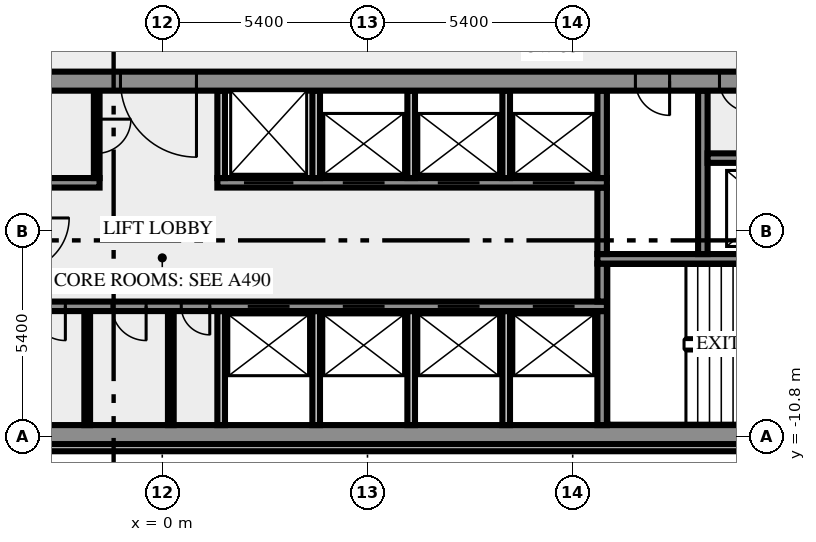
"""IFC4 building model, lengths in metres.
Left out: names, types, materials, properties, quantities, classifications, styles, units other than length and angle.
Written with IfcOpenShell. Run it as: python <this file> out.ifc"""

import sys

from ifc_helpers import new_model, si_unit, direction, frame, frame_2d, origin, place, context, subcontext, project, spatial, rectangle, extrude, element, fill, save


model = new_model("IFC4")
c1 = context("Model", 3, precision=1e-05, world=origin(), true_north=direction((0.0, 1.0)))
c2 = subcontext(c1, "Body", "Model", "MODEL_VIEW")
j1 = project(units=[si_unit("LENGTHUNIT", "METRE"), si_unit("PLANEANGLEUNIT", "RADIAN")], contexts=[c1])
p1 = place(None, origin())
s1 = spatial("IfcSite", under=j1, at=p1, CompositionType="ELEMENT")
p2 = place(p1, origin())
s2 = spatial("IfcBuilding", under=s1, at=p2, CompositionType="ELEMENT")
p3 = place(p2, frame((0.0, 0.0, 194.0)))
s3 = spatial("IfcBuildingStorey", under=s2, at=p3, CompositionType="ELEMENT", Elevation=194.0)
p4 = place(p3, frame((-17.444, -11.088, 0.0), z_axis=(0.0, 0.0, 1.0), x_axis=(1.0, 0.0, 0.0)))
e1 = element("IfcWall", 1, at=p4, inside=s3, PredefinedType="SOLIDWALL", context=c2, shape_type="SweptSolid", body=[
    extrude(rectangle(XDim=34.888, YDim=0.2, at=frame_2d((17.444, 0.0))), origin(), (0.0, 0.0, 1.0), 3.65),
])
p5 = place(p3, frame((-20.0, -10.75, 0.0), z_axis=(0.0, 0.0, 1.0), x_axis=(1.0, 0.0, 0.0)))
e2 = element("IfcWall", 2, at=p5, inside=s3, PredefinedType="SHEAR", context=c2, shape_type="SweptSolid", body=[
    extrude(rectangle(XDim=40.0, YDim=0.5, at=frame_2d((20.0, 0.0))), origin(), (0.0, 0.0, 1.0), 3.65),
])
p6 = place(p5, frame((0.8, 0.0, 1.0)))
e3 = element("IfcOpeningElement", 3, at=p6, cuts=e2, PredefinedType="OPENING", context=c2, shape_type="SweptSolid", body=[
    extrude(rectangle(XDim=1.2, YDim=1.2, at=frame_2d((0.6, 0.6))), frame((0.0, 0.26, 0.0), z_axis=(0.0, -1.0, 0.0), x_axis=(1.0, 0.0, 0.0)), (0.0, 0.0, 1.0), 0.52),
])
p7 = place(p5, frame((38.0, 0.0, 1.0)))
e4 = element("IfcOpeningElement", 4, at=p7, cuts=e2, PredefinedType="OPENING", context=c2, shape_type="SweptSolid", body=[
    extrude(rectangle(XDim=1.2, YDim=1.2, at=frame_2d((0.6, 0.6))), frame((0.0, 0.26, 0.0), z_axis=(0.0, -1.0, 0.0), x_axis=(1.0, 0.0, 0.0)), (0.0, 0.0, 1.0), 0.52),
])
for number, where, z_axis, x_axis in (
    (5, (-1.975, -10.5, 0.0), (0.0, 0.0, 1.0), (0.0, 1.0, 0.0)),
    (6, (0.225, -10.5, 0.0), (0.0, 0.0, 1.0), (0.0, 1.0, 0.0)),
):
    element("IfcWall", number, at=place(p3, frame(where, z_axis=z_axis, x_axis=x_axis)), inside=s3, PredefinedType="PARTITIONING", context=c2, shape_type="SweptSolid", body=[
        extrude(rectangle(XDim=3.0, YDim=0.15, at=frame_2d((1.5, 0.0))), origin(), (0.0, 0.0, 1.0), 3.65),
    ])
for number, where, z_axis, x_axis in (
    (7, (1.55, -10.5, 0.0), (0.0, 0.0, 1.0), (0.0, 1.0, 0.0)),
    (8, (4.05, -10.5, 0.0), (0.0, 0.0, 1.0), (0.0, 1.0, 0.0)),
    (9, (6.55, -10.5, 0.0), (0.0, 0.0, 1.0), (0.0, 1.0, 0.0)),
    (10, (9.05, -10.5, 0.0), (0.0, 0.0, 1.0), (0.0, 1.0, 0.0)),
):
    element("IfcWall", number, at=place(p3, frame(where, z_axis=z_axis, x_axis=x_axis)), inside=s3, PredefinedType="SOLIDWALL", context=c2, shape_type="SweptSolid", body=[
        extrude(rectangle(XDim=3.0, YDim=0.2, at=frame_2d((1.5, 0.0))), origin(), (0.0, 0.0, 1.0), 3.65),
    ])
p8 = place(p3, frame((11.575, -10.5, 0.0), z_axis=(0.0, 0.0, 1.0), x_axis=(0.0, 1.0, 0.0)))
e11 = element("IfcWall", 11, at=p8, inside=s3, PredefinedType="SHEAR", context=c2, shape_type="SweptSolid", body=[
    extrude(rectangle(XDim=3.0, YDim=0.25, at=frame_2d((1.5, 0.0))), origin(), (0.0, 0.0, 1.0), 3.65),
])
p9 = place(p3, frame((11.7, -7.375, 0.0), z_axis=(0.0, 0.0, 1.0), x_axis=(-1.0, 0.0, 0.0)))
e12 = element("IfcWall", 12, at=p9, inside=s3, PredefinedType="SHEAR", context=c2, shape_type="SweptSolid", body=[
    extrude(rectangle(XDim=23.4, YDim=0.25, at=frame_2d((11.7, 0.0))), origin(), (0.0, 0.0, 1.0), 3.65),
])
p10 = place(p9, frame((22.012, 0.0, 0.0)))
e13 = element("IfcOpeningElement", 13, at=p10, cuts=e12, PredefinedType="OPENING", context=c2, shape_type="SweptSolid", body=[
    extrude(rectangle(XDim=0.9, YDim=2.1, at=frame_2d((0.45, 1.05))), frame((0.0, 0.135, 0.0), z_axis=(0.0, -1.0, 0.0), x_axis=(1.0, 0.0, 0.0)), (0.0, 0.0, 1.0), 0.27),
])
p11 = place(p9, frame((20.25, 0.0, 0.0)))
e14 = element("IfcOpeningElement", 14, at=p11, cuts=e12, PredefinedType="OPENING", context=c2, shape_type="SweptSolid", body=[
    extrude(rectangle(XDim=0.9, YDim=2.1, at=frame_2d((0.45, 1.05))), frame((0.0, 0.135, 0.0), z_axis=(0.0, -1.0, 0.0), x_axis=(1.0, 0.0, 0.0)), (0.0, 0.0, 1.0), 0.27),
])
p12 = place(p9, frame((18.25, 0.0, 0.0)))
e15 = element("IfcOpeningElement", 15, at=p12, cuts=e12, PredefinedType="OPENING", context=c2, shape_type="SweptSolid", body=[
    extrude(rectangle(XDim=0.9, YDim=2.1, at=frame_2d((0.45, 1.05))), frame((0.0, 0.135, 0.0), z_axis=(0.0, -1.0, 0.0), x_axis=(1.0, 0.0, 0.0)), (0.0, 0.0, 1.0), 0.27),
])
p13 = place(p9, frame((16.287, 0.0, 0.0)))
e16 = element("IfcOpeningElement", 16, at=p13, cuts=e12, PredefinedType="OPENING", context=c2, shape_type="SweptSolid", body=[
    extrude(rectangle(XDim=0.9, YDim=2.1, at=frame_2d((0.45, 1.05))), frame((0.0, 0.135, 0.0), z_axis=(0.0, -1.0, 0.0), x_axis=(1.0, 0.0, 0.0)), (0.0, 0.0, 1.0), 0.27),
])
p14 = place(p9, frame((14.25, 0.0, 0.0)))
e17 = element("IfcOpeningElement", 17, at=p14, cuts=e12, PredefinedType="OPENING", context=c2, shape_type="SweptSolid", body=[
    extrude(rectangle(XDim=0.9, YDim=2.1, at=frame_2d((0.45, 1.05))), frame((0.0, 0.135, 0.0), z_axis=(0.0, -1.0, 0.0), x_axis=(1.0, 0.0, 0.0)), (0.0, 0.0, 1.0), 0.27),
])
p15 = place(p9, frame((12.125, 0.0, 0.0)))
e18 = element("IfcOpeningElement", 18, at=p15, cuts=e12, PredefinedType="OPENING", context=c2, shape_type="SweptSolid", body=[
    extrude(rectangle(XDim=0.9, YDim=2.1, at=frame_2d((0.45, 1.05))), frame((0.0, 0.135, 0.0), z_axis=(0.0, -1.0, 0.0), x_axis=(1.0, 0.0, 0.0)), (0.0, 0.0, 1.0), 0.27),
])
p16 = place(p9, frame((10.45, 0.0, 0.0)))
e19 = element("IfcOpeningElement", 19, at=p16, cuts=e12, PredefinedType="OPENING", context=c2, shape_type="SweptSolid", body=[
    extrude(rectangle(XDim=0.75, YDim=2.1, at=frame_2d((0.375, 1.05))), frame((0.0, 0.135, 0.0), z_axis=(0.0, -1.0, 0.0), x_axis=(1.0, 0.0, 0.0)), (0.0, 0.0, 1.0), 0.27),
])
p17 = place(p9, frame((8.35, 0.0, 0.0)))
e20 = element("IfcOpeningElement", 20, at=p17, cuts=e12, PredefinedType="OPENING", context=c2, shape_type="SweptSolid", body=[
    extrude(rectangle(XDim=1.1, YDim=2.1, at=frame_2d((0.55, 1.05))), frame((0.0, 0.135, 0.0), z_axis=(0.0, -1.0, 0.0), x_axis=(1.0, 0.0, 0.0)), (0.0, 0.0, 1.0), 0.27),
])
p18 = place(p9, frame((5.85, 0.0, 0.0)))
e21 = element("IfcOpeningElement", 21, at=p18, cuts=e12, PredefinedType="OPENING", context=c2, shape_type="SweptSolid", body=[
    extrude(rectangle(XDim=1.1, YDim=2.1, at=frame_2d((0.55, 1.05))), frame((0.0, 0.135, 0.0), z_axis=(0.0, -1.0, 0.0), x_axis=(1.0, 0.0, 0.0)), (0.0, 0.0, 1.0), 0.27),
])
p19 = place(p9, frame((3.35, 0.0, 0.0)))
e22 = element("IfcOpeningElement", 22, at=p19, cuts=e12, PredefinedType="OPENING", context=c2, shape_type="SweptSolid", body=[
    extrude(rectangle(XDim=1.1, YDim=2.1, at=frame_2d((0.55, 1.05))), frame((0.0, 0.135, 0.0), z_axis=(0.0, -1.0, 0.0), x_axis=(1.0, 0.0, 0.0)), (0.0, 0.0, 1.0), 0.27),
])
p20 = place(p9, frame((0.85, 0.0, 0.0)))
e23 = element("IfcOpeningElement", 23, at=p20, cuts=e12, PredefinedType="OPENING", context=c2, shape_type="SweptSolid", body=[
    extrude(rectangle(XDim=1.1, YDim=2.1, at=frame_2d((0.55, 1.05))), frame((0.0, 0.135, 0.0), z_axis=(0.0, -1.0, 0.0), x_axis=(1.0, 0.0, 0.0)), (0.0, 0.0, 1.0), 0.27),
])
p21 = place(p3, frame((11.575, -7.25, 0.0), z_axis=(0.0, 0.0, 1.0), x_axis=(0.0, 1.0, 0.0)))
e24 = element("IfcWall", 24, at=p21, inside=s3, PredefinedType="SHEAR", context=c2, shape_type="SweptSolid", body=[
    extrude(rectangle(XDim=1.0, YDim=0.25, at=frame_2d((0.5, 0.0))), origin(), (0.0, 0.0, 1.0), 3.65),
])
p22 = place(p3, frame((19.5, -6.125, 0.0), z_axis=(0.0, 0.0, 1.0), x_axis=(-1.0, 0.0, 0.0)))
e25 = element("IfcWall", 25, at=p22, inside=s3, PredefinedType="SHEAR", context=c2, shape_type="SweptSolid", body=[
    extrude(rectangle(XDim=8.05, YDim=0.25, at=frame_2d((4.025, 0.0))), origin(), (0.0, 0.0, 1.0), 3.65),
])
p23 = place(p22, frame((0.05, 0.0, 0.0)))
e26 = element("IfcOpeningElement", 26, at=p23, cuts=e25, PredefinedType="OPENING", context=c2, shape_type="SweptSolid", body=[
    extrude(rectangle(XDim=1.8, YDim=2.1, at=frame_2d((0.9, 1.05))), frame((0.0, 0.135, 0.0), z_axis=(0.0, -1.0, 0.0), x_axis=(1.0, 0.0, 0.0)), (0.0, 0.0, 1.0), 0.27),
])
p24 = place(p3, frame((11.575, -6.0, 0.0), z_axis=(0.0, 0.0, 1.0), x_axis=(0.0, 1.0, 0.0)))
e27 = element("IfcWall", 27, at=p24, inside=s3, PredefinedType="SHEAR", context=c2, shape_type="SweptSolid", body=[
    extrude(rectangle(XDim=1.75, YDim=0.25, at=frame_2d((0.875, 0.0))), origin(), (0.0, 0.0, 1.0), 3.65),
])
p25 = place(p3, frame((14.225, -6.0, 0.0), z_axis=(0.0, 0.0, 1.0), x_axis=(0.0, 1.0, 0.0)))
e28 = element("IfcWall", 28, at=p25, inside=s3, PredefinedType="SHEAR", context=c2, shape_type="SweptSolid", body=[
    extrude(rectangle(XDim=4.3, YDim=0.25, at=frame_2d((2.15, 0.0))), origin(), (0.0, 0.0, 1.0), 3.65),
])
p26 = place(p3, frame((-11.7, -4.125, 0.0), z_axis=(0.0, 0.0, 1.0), x_axis=(1.0, 0.0, 0.0)))
e29 = element("IfcWall", 29, at=p26, inside=s3, PredefinedType="SHEAR", context=c2, shape_type="SweptSolid", body=[
    extrude(rectangle(XDim=10.05, YDim=0.25, at=frame_2d((5.025, 0.0))), origin(), (0.0, 0.0, 1.0), 3.65),
])
p27 = place(p3, frame((1.45, -4.125, 0.0), z_axis=(0.0, 0.0, 1.0), x_axis=(1.0, 0.0, 0.0)))
e30 = element("IfcWall", 30, at=p27, inside=s3, PredefinedType="SHEAR", context=c2, shape_type="SweptSolid", body=[
    extrude(rectangle(XDim=10.25, YDim=0.25, at=frame_2d((5.125, 0.0))), origin(), (0.0, 0.0, 1.0), 3.65),
])
p28 = place(p27, frame((0.7, 0.0, 0.0)))
e31 = element("IfcOpeningElement", 31, at=p28, cuts=e30, PredefinedType="OPENING", context=c2, shape_type="SweptSolid", body=[
    extrude(rectangle(XDim=1.3, YDim=2.1, at=frame_2d((0.65, 1.05))), frame((0.0, 0.135, 0.0), z_axis=(0.0, -1.0, 0.0), x_axis=(1.0, 0.0, 0.0)), (0.0, 0.0, 1.0), 0.27),
])
p29 = place(p27, frame((3.3, 0.0, 0.0)))
e32 = element("IfcOpeningElement", 32, at=p29, cuts=e30, PredefinedType="OPENING", context=c2, shape_type="SweptSolid", body=[
    extrude(rectangle(XDim=1.1, YDim=2.1, at=frame_2d((0.55, 1.05))), frame((0.0, 0.135, 0.0), z_axis=(0.0, -1.0, 0.0), x_axis=(1.0, 0.0, 0.0)), (0.0, 0.0, 1.0), 0.27),
])
p30 = place(p27, frame((5.8, 0.0, 0.0)))
e33 = element("IfcOpeningElement", 33, at=p30, cuts=e30, PredefinedType="OPENING", context=c2, shape_type="SweptSolid", body=[
    extrude(rectangle(XDim=1.1, YDim=2.1, at=frame_2d((0.55, 1.05))), frame((0.0, 0.135, 0.0), z_axis=(0.0, -1.0, 0.0), x_axis=(1.0, 0.0, 0.0)), (0.0, 0.0, 1.0), 0.27),
])
p31 = place(p27, frame((8.3, 0.0, 0.0)))
e34 = element("IfcOpeningElement", 34, at=p31, cuts=e30, PredefinedType="OPENING", context=c2, shape_type="SweptSolid", body=[
    extrude(rectangle(XDim=1.1, YDim=2.1, at=frame_2d((0.55, 1.05))), frame((0.0, 0.135, 0.0), z_axis=(0.0, -1.0, 0.0), x_axis=(1.0, 0.0, 0.0)), (0.0, 0.0, 1.0), 0.27),
])
p32 = place(p3, frame((-1.725, -1.7, 0.0), z_axis=(0.0, 0.0, 1.0), x_axis=(0.0, -1.0, 0.0)))
e35 = element("IfcWall", 35, at=p32, inside=s3, PredefinedType="PARTITIONING", context=c2, shape_type="SweptSolid", body=[
    extrude(rectangle(XDim=2.3, YDim=0.15, at=frame_2d((1.15, 0.0))), origin(), (0.0, 0.0, 1.0), 3.65),
])
p33 = place(p32, frame((0.75, 0.0, 0.0)))
e36 = element("IfcOpeningElement", 36, at=p33, cuts=e35, PredefinedType="OPENING", context=c2, shape_type="SweptSolid", body=[
    extrude(rectangle(XDim=0.9, YDim=2.1, at=frame_2d((0.45, 1.05))), frame((0.0, 0.085, 0.0), z_axis=(0.0, -1.0, 0.0), x_axis=(1.0, 0.0, 0.0)), (0.0, 0.0, 1.0), 0.17),
])
for number, where, z_axis, x_axis in (
    (37, (1.55, -4.0, 0.0), (0.0, 0.0, 1.0), (0.0, 1.0, 0.0)),
    (38, (4.05, -4.0, 0.0), (0.0, 0.0, 1.0), (0.0, 1.0, 0.0)),
    (39, (6.55, -4.0, 0.0), (0.0, 0.0, 1.0), (0.0, 1.0, 0.0)),
    (40, (9.05, -4.0, 0.0), (0.0, 0.0, 1.0), (0.0, 1.0, 0.0)),
):
    element("IfcWall", number, at=place(p3, frame(where, z_axis=z_axis, x_axis=x_axis)), inside=s3, PredefinedType="SOLIDWALL", context=c2, shape_type="SweptSolid", body=[
        extrude(rectangle(XDim=2.3, YDim=0.2, at=frame_2d((1.15, 0.0))), origin(), (0.0, 0.0, 1.0), 3.65),
    ])
p34 = place(p3, frame((11.575, -4.0, 0.0), z_axis=(0.0, 0.0, 1.0), x_axis=(0.0, 1.0, 0.0)))
e41 = element("IfcWall", 41, at=p34, inside=s3, PredefinedType="SHEAR", context=c2, shape_type="SweptSolid", body=[
    extrude(rectangle(XDim=2.3, YDim=0.25, at=frame_2d((1.15, 0.0))), origin(), (0.0, 0.0, 1.0), 3.65),
])
p35 = place(p3, frame((14.35, -3.475, 0.0), z_axis=(0.0, 0.0, 1.0), x_axis=(1.0, 0.0, 0.0)))
e42 = element("IfcWall", 42, at=p35, inside=s3, PredefinedType="SHEAR", context=c2, shape_type="SweptSolid", body=[
    extrude(rectangle(XDim=3.0, YDim=0.25, at=frame_2d((1.5, 0.0))), origin(), (0.0, 0.0, 1.0), 3.65),
])
p36 = place(p3, frame((20.49, -1.45, 0.0), z_axis=(0.0, 0.0, 1.0), x_axis=(-1.0, 0.0, 0.0)))
e43 = element("IfcWall", 43, at=p36, inside=s3, PredefinedType="SHEAR", context=c2, shape_type="SweptSolid", body=[
    extrude(rectangle(XDim=40.98, YDim=0.5, at=frame_2d((20.49, 0.0))), origin(), (0.0, 0.0, 1.0), 3.65),
])
p37 = place(p36, frame((38.14, 0.0, 0.0)))
e44 = element("IfcOpeningElement", 44, at=p37, cuts=e43, PredefinedType="OPENING", context=c2, shape_type="SweptSolid", body=[
    extrude(rectangle(XDim=1.8, YDim=2.1, at=frame_2d((0.9, 1.05))), frame((0.0, 0.26, 0.0), z_axis=(0.0, -1.0, 0.0), x_axis=(1.0, 0.0, 0.0)), (0.0, 0.0, 1.0), 0.52),
])
p38 = place(p36, frame((35.89, 0.0, 0.0)))
e45 = element("IfcOpeningElement", 45, at=p38, cuts=e43, PredefinedType="OPENING", context=c2, shape_type="SweptSolid", body=[
    extrude(rectangle(XDim=0.9, YDim=2.1, at=frame_2d((0.45, 1.05))), frame((0.0, 0.26, 0.0), z_axis=(0.0, -1.0, 0.0), x_axis=(1.0, 0.0, 0.0)), (0.0, 0.0, 1.0), 0.52),
])
p39 = place(p36, frame((32.94, 0.0, 0.0)))
e46 = element("IfcOpeningElement", 46, at=p39, cuts=e43, PredefinedType="OPENING", context=c2, shape_type="SweptSolid", body=[
    extrude(rectangle(XDim=0.9, YDim=2.1, at=frame_2d((0.45, 1.05))), frame((0.0, 0.26, 0.0), z_axis=(0.0, -1.0, 0.0), x_axis=(1.0, 0.0, 0.0)), (0.0, 0.0, 1.0), 0.52),
])
p40 = place(p36, frame((30.302, 0.0, 0.0)))
e47 = element("IfcOpeningElement", 47, at=p40, cuts=e43, PredefinedType="OPENING", context=c2, shape_type="SweptSolid", body=[
    extrude(rectangle(XDim=0.9, YDim=2.1, at=frame_2d((0.45, 1.05))), frame((0.0, 0.26, 0.0), z_axis=(0.0, -1.0, 0.0), x_axis=(1.0, 0.0, 0.0)), (0.0, 0.0, 1.0), 0.52),
])
p41 = place(p36, frame((26.577, 0.0, 0.0)))
e48 = element("IfcOpeningElement", 48, at=p41, cuts=e43, PredefinedType="OPENING", context=c2, shape_type="SweptSolid", body=[
    extrude(rectangle(XDim=0.9, YDim=2.1, at=frame_2d((0.45, 1.05))), frame((0.0, 0.26, 0.0), z_axis=(0.0, -1.0, 0.0), x_axis=(1.0, 0.0, 0.0)), (0.0, 0.0, 1.0), 0.52),
])
p42 = place(p36, frame((19.59, 0.0, 0.0)))
e49 = element("IfcOpeningElement", 49, at=p42, cuts=e43, PredefinedType="OPENING", context=c2, shape_type="SweptSolid", body=[
    extrude(rectangle(XDim=2.0, YDim=2.1, at=frame_2d((1.0, 1.05))), frame((0.0, 0.26, 0.0), z_axis=(0.0, -1.0, 0.0), x_axis=(1.0, 0.0, 0.0)), (0.0, 0.0, 1.0), 0.52),
])
p43 = place(p36, frame((7.14, 0.0, 0.0)))
e50 = element("IfcOpeningElement", 50, at=p43, cuts=e43, PredefinedType="OPENING", context=c2, shape_type="SweptSolid", body=[
    extrude(rectangle(XDim=0.9, YDim=2.1, at=frame_2d((0.45, 1.05))), frame((0.0, 0.26, 0.0), z_axis=(0.0, -1.0, 0.0), x_axis=(1.0, 0.0, 0.0)), (0.0, 0.0, 1.0), 0.52),
])
p44 = place(p36, frame((5.028, 0.0, 0.0)))
e51 = element("IfcOpeningElement", 51, at=p44, cuts=e43, PredefinedType="OPENING", context=c2, shape_type="SweptSolid", body=[
    extrude(rectangle(XDim=0.8, YDim=2.1, at=frame_2d((0.4, 1.05))), frame((0.0, 0.26, 0.0), z_axis=(0.0, -1.0, 0.0), x_axis=(1.0, 0.0, 0.0)), (0.0, 0.0, 1.0), 0.52),
])
p45 = place(p36, frame((3.452, 0.0, 0.0)))
e52 = element("IfcOpeningElement", 52, at=p45, cuts=e43, PredefinedType="OPENING", context=c2, shape_type="SweptSolid", body=[
    extrude(rectangle(XDim=0.8, YDim=2.1, at=frame_2d((0.4, 1.05))), frame((0.0, 0.26, 0.0), z_axis=(0.0, -1.0, 0.0), x_axis=(1.0, 0.0, 0.0)), (0.0, 0.0, 1.0), 0.52),
])
p46 = place(p36, frame((1.04, 0.0, 0.0)))
e53 = element("IfcOpeningElement", 53, at=p46, cuts=e43, PredefinedType="OPENING", context=c2, shape_type="SweptSolid", body=[
    extrude(rectangle(XDim=1.8, YDim=2.1, at=frame_2d((0.9, 1.05))), frame((0.0, 0.26, 0.0), z_axis=(0.0, -1.0, 0.0), x_axis=(1.0, 0.0, 0.0)), (0.0, 0.0, 1.0), 0.52),
])
p47 = place(p14, origin())
e54 = element("IfcDoor", 54, at=p47, inside=s3, OperationType="SINGLE_SWING_RIGHT", PredefinedType="DOOR", context=c2, shape_type="SweptSolid", body=[
    extrude(rectangle(XDim=0.9, YDim=2.1, at=frame_2d((0.45, 1.05))), frame((0.0, 0.025, 0.0), z_axis=(0.0, -1.0, 0.0), x_axis=(1.0, 0.0, 0.0)), (0.0, 0.0, 1.0), 0.05),
])
fill(e17, e54)
p48 = place(p15, origin())
e55 = element("IfcDoor", 55, at=p48, inside=s3, OperationType="SINGLE_SWING_RIGHT", PredefinedType="DOOR", context=c2, shape_type="SweptSolid", body=[
    extrude(rectangle(XDim=0.9, YDim=2.1, at=frame_2d((0.45, 1.05))), frame((0.0, 0.025, 0.0), z_axis=(0.0, -1.0, 0.0), x_axis=(1.0, 0.0, 0.0)), (0.0, 0.0, 1.0), 0.05),
])
fill(e18, e55)
p49 = place(p16, origin())
e56 = element("IfcDoor", 56, at=p49, inside=s3, OperationType="SINGLE_SWING_LEFT", PredefinedType="DOOR", context=c2, shape_type="SweptSolid", body=[
    extrude(rectangle(XDim=0.75, YDim=2.1, at=frame_2d((0.375, 1.05))), frame((0.0, 0.025, 0.0), z_axis=(0.0, -1.0, 0.0), x_axis=(1.0, 0.0, 0.0)), (0.0, 0.0, 1.0), 0.05),
])
fill(e19, e56)
p50 = place(p17, origin())
e57 = element("IfcDoor", 57, at=p50, inside=s3, OperationType="DOUBLE_DOOR_SLIDING", PredefinedType="DOOR", context=c2, shape_type="SweptSolid", body=[
    extrude(rectangle(XDim=1.1, YDim=2.1, at=frame_2d((0.55, 1.05))), frame((0.0, 0.025, 0.0), z_axis=(0.0, -1.0, 0.0), x_axis=(1.0, 0.0, 0.0)), (0.0, 0.0, 1.0), 0.05),
])
fill(e20, e57)
p51 = place(p18, origin())
e58 = element("IfcDoor", 58, at=p51, inside=s3, OperationType="DOUBLE_DOOR_SLIDING", PredefinedType="DOOR", context=c2, shape_type="SweptSolid", body=[
    extrude(rectangle(XDim=1.1, YDim=2.1, at=frame_2d((0.55, 1.05))), frame((0.0, 0.025, 0.0), z_axis=(0.0, -1.0, 0.0), x_axis=(1.0, 0.0, 0.0)), (0.0, 0.0, 1.0), 0.05),
])
fill(e21, e58)
p52 = place(p19, origin())
e59 = element("IfcDoor", 59, at=p52, inside=s3, OperationType="DOUBLE_DOOR_SLIDING", PredefinedType="DOOR", context=c2, shape_type="SweptSolid", body=[
    extrude(rectangle(XDim=1.1, YDim=2.1, at=frame_2d((0.55, 1.05))), frame((0.0, 0.025, 0.0), z_axis=(0.0, -1.0, 0.0), x_axis=(1.0, 0.0, 0.0)), (0.0, 0.0, 1.0), 0.05),
])
fill(e22, e59)
p53 = place(p20, origin())
e60 = element("IfcDoor", 60, at=p53, inside=s3, OperationType="DOUBLE_DOOR_SLIDING", PredefinedType="DOOR", context=c2, shape_type="SweptSolid", body=[
    extrude(rectangle(XDim=1.1, YDim=2.1, at=frame_2d((0.55, 1.05))), frame((0.0, 0.025, 0.0), z_axis=(0.0, -1.0, 0.0), x_axis=(1.0, 0.0, 0.0)), (0.0, 0.0, 1.0), 0.05),
])
fill(e23, e60)
p54 = place(p28, origin())
e61 = element("IfcDoor", 61, at=p54, inside=s3, OperationType="DOUBLE_DOOR_SLIDING", PredefinedType="DOOR", context=c2, shape_type="SweptSolid", body=[
    extrude(rectangle(XDim=1.3, YDim=2.1, at=frame_2d((0.65, 1.05))), frame((0.0, 0.025, 0.0), z_axis=(0.0, -1.0, 0.0), x_axis=(1.0, 0.0, 0.0)), (0.0, 0.0, 1.0), 0.05),
])
fill(e31, e61)
p55 = place(p29, origin())
e62 = element("IfcDoor", 62, at=p55, inside=s3, OperationType="DOUBLE_DOOR_SLIDING", PredefinedType="DOOR", context=c2, shape_type="SweptSolid", body=[
    extrude(rectangle(XDim=1.1, YDim=2.1, at=frame_2d((0.55, 1.05))), frame((0.0, 0.025, 0.0), z_axis=(0.0, -1.0, 0.0), x_axis=(1.0, 0.0, 0.0)), (0.0, 0.0, 1.0), 0.05),
])
fill(e32, e62)
p56 = place(p30, origin())
e63 = element("IfcDoor", 63, at=p56, inside=s3, OperationType="DOUBLE_DOOR_SLIDING", PredefinedType="DOOR", context=c2, shape_type="SweptSolid", body=[
    extrude(rectangle(XDim=1.1, YDim=2.1, at=frame_2d((0.55, 1.05))), frame((0.0, 0.025, 0.0), z_axis=(0.0, -1.0, 0.0), x_axis=(1.0, 0.0, 0.0)), (0.0, 0.0, 1.0), 0.05),
])
fill(e33, e63)
p57 = place(p31, origin())
e64 = element("IfcDoor", 64, at=p57, inside=s3, OperationType="DOUBLE_DOOR_SLIDING", PredefinedType="DOOR", context=c2, shape_type="SweptSolid", body=[
    extrude(rectangle(XDim=1.1, YDim=2.1, at=frame_2d((0.55, 1.05))), frame((0.0, 0.025, 0.0), z_axis=(0.0, -1.0, 0.0), x_axis=(1.0, 0.0, 0.0)), (0.0, 0.0, 1.0), 0.05),
])
fill(e34, e64)
p58 = place(p33, origin())
e65 = element("IfcDoor", 65, at=p58, inside=s3, OperationType="SINGLE_SWING_RIGHT", PredefinedType="DOOR", context=c2, shape_type="SweptSolid", body=[
    extrude(rectangle(XDim=0.9, YDim=2.1, at=frame_2d((0.45, 1.05))), frame((0.0, 0.025, 0.0), z_axis=(0.0, -1.0, 0.0), x_axis=(1.0, 0.0, 0.0)), (0.0, 0.0, 1.0), 0.05),
])
fill(e36, e65)
p59 = place(p42, origin())
e66 = element("IfcDoor", 66, at=p59, inside=s3, OperationType="DOUBLE_DOOR_SINGLE_SWING", PredefinedType="DOOR", context=c2, shape_type="SweptSolid", body=[
    extrude(rectangle(XDim=2.0, YDim=2.1, at=frame_2d((1.0, 1.05))), frame((0.0, 0.025, 0.0), z_axis=(0.0, -1.0, 0.0), x_axis=(1.0, 0.0, 0.0)), (0.0, 0.0, 1.0), 0.05),
])
fill(e49, e66)
p60 = place(p43, origin())
e67 = element("IfcDoor", 67, at=p60, inside=s3, OperationType="SINGLE_SWING_LEFT", PredefinedType="DOOR", context=c2, shape_type="SweptSolid", body=[
    extrude(rectangle(XDim=0.9, YDim=2.1, at=frame_2d((0.45, 1.05))), frame((0.0, 0.025, 0.0), z_axis=(0.0, -1.0, 0.0), x_axis=(1.0, 0.0, 0.0)), (0.0, 0.0, 1.0), 0.05),
])
fill(e50, e67)
p61 = place(p44, origin())
e68 = element("IfcDoor", 68, at=p61, inside=s3, OperationType="SINGLE_SWING_LEFT", PredefinedType="DOOR", context=c2, shape_type="SweptSolid", body=[
    extrude(rectangle(XDim=0.8, YDim=2.1, at=frame_2d((0.4, 1.05))), frame((0.0, 0.025, 0.0), z_axis=(0.0, -1.0, 0.0), x_axis=(1.0, 0.0, 0.0)), (0.0, 0.0, 1.0), 0.05),
])
fill(e51, e68)
save(model, sys.argv[1])
